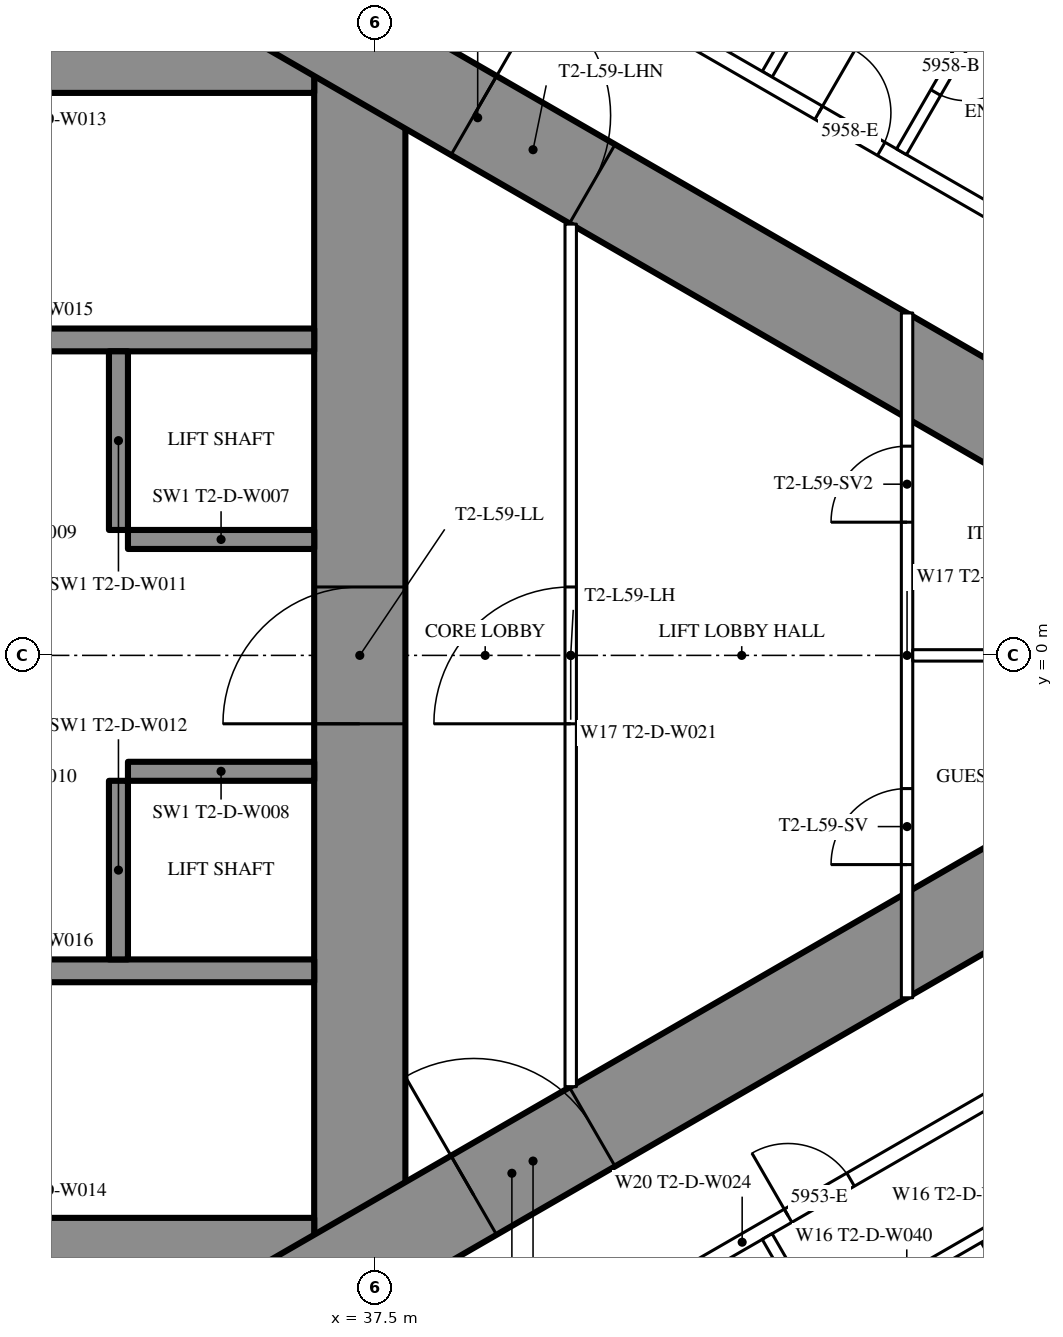
"""IFC4 building model, lengths in metres.
Left out: names, types, materials, properties, quantities, classifications, styles, units other than length and angle.
Written with IfcOpenShell. Run it as: python <this file> out.ifc"""

import sys

from ifc_helpers import new_model, si_unit, direction, frame, frame_2d, origin, place, context, subcontext, project, spatial, rectangle, extrude, element, fill, save


model = new_model("IFC4")
c1 = context("Model", 3, precision=1e-05, world=origin(), true_north=direction((0.0, 1.0)))
c2 = subcontext(c1, "Body", "Model", "MODEL_VIEW")
j1 = project(units=[si_unit("LENGTHUNIT", "METRE"), si_unit("PLANEANGLEUNIT", "RADIAN")], contexts=[c1])
p1 = place(None, origin())
s1 = spatial("IfcSite", under=j1, at=p1, CompositionType="ELEMENT")
p2 = place(p1, origin())
s2 = spatial("IfcBuilding", under=s1, at=p2, CompositionType="ELEMENT")
p3 = place(p2, frame((0.0, 0.0, 222.5)))
s3 = spatial("IfcBuildingStorey", under=s2, at=p3, CompositionType="ELEMENT", Elevation=222.5)
p4 = place(p3, frame((37.3, -8.6, 0.0), z_axis=(0.0, 0.0, 1.0), x_axis=(0.0, 1.0, 0.0)))
e1 = element("IfcWall", 1, at=p4, inside=s3, PredefinedType="SHEAR", context=c2, shape_type="SweptSolid", body=[
    extrude(rectangle(XDim=17.2, YDim=1.2, at=frame_2d((8.6, 0.0))), origin(), (0.0, 0.0, 1.0), 3.6),
])
p5 = place(p4, frame((7.7, 0.0, 0.0)))
e2 = element("IfcOpeningElement", 2, at=p5, cuts=e1, PredefinedType="OPENING", context=c2, shape_type="SweptSolid", body=[
    extrude(rectangle(XDim=1.8, YDim=2.2, at=frame_2d((0.9, 1.1))), frame((0.0, 0.61, 0.0), z_axis=(0.0, -1.0, 0.0), x_axis=(1.0, 0.0, 0.0)), (0.0, 0.0, 1.0), 1.22),
])
p6 = place(p3, frame((28.3, -8.0, 0.0), z_axis=(0.0, 0.0, 1.0), x_axis=(1.0, 0.0, 0.0)))
e3 = element("IfcWall", 3, at=p6, inside=s3, PredefinedType="SHEAR", context=c2, shape_type="SweptSolid", body=[
    extrude(rectangle(XDim=8.4, YDim=1.2, at=frame_2d((4.2, 0.0))), origin(), (0.0, 0.0, 1.0), 3.6),
])
p7 = place(p6, frame((0.25, 0.0, 0.0)))
e4 = element("IfcOpeningElement", 4, at=p7, cuts=e3, PredefinedType="OPENING", context=c2, shape_type="SweptSolid", body=[
    extrude(rectangle(XDim=1.0, YDim=2.2, at=frame_2d((0.5, 1.1))), frame((0.0, 0.61, 0.0), z_axis=(0.0, -1.0, 0.0), x_axis=(1.0, 0.0, 0.0)), (0.0, 0.0, 1.0), 1.22),
])
p8 = place(p3, frame((28.3, 8.0, 0.0), z_axis=(0.0, 0.0, 1.0), x_axis=(1.0, 0.0, 0.0)))
e5 = element("IfcWall", 5, at=p8, inside=s3, PredefinedType="SHEAR", context=c2, shape_type="SweptSolid", body=[
    extrude(rectangle(XDim=8.4, YDim=1.2, at=frame_2d((4.2, 0.0))), origin(), (0.0, 0.0, 1.0), 3.6),
])
p9 = place(p8, frame((0.25, 0.0, 0.0)))
e6 = element("IfcOpeningElement", 6, at=p9, cuts=e5, PredefinedType="OPENING", context=c2, shape_type="SweptSolid", body=[
    extrude(rectangle(XDim=1.0, YDim=2.2, at=frame_2d((0.5, 1.1))), frame((0.0, 0.61, 0.0), z_axis=(0.0, -1.0, 0.0), x_axis=(1.0, 0.0, 0.0)), (0.0, 0.0, 1.0), 1.22),
])
for number, where, z_axis, x_axis in (
    (7, (28.3, -4.15, 0.0), (0.0, 0.0, 1.0), (1.0, 0.0, 0.0)),
    (8, (28.3, 4.15, 0.0), (0.0, 0.0, 1.0), (1.0, 0.0, 0.0)),
):
    element("IfcWall", number, at=place(p3, frame(where, z_axis=z_axis, x_axis=x_axis)), inside=s3, PredefinedType="SHEAR", context=c2, shape_type="SweptSolid", body=[
        extrude(rectangle(XDim=8.4, YDim=0.3, at=frame_2d((4.2, 0.0))), origin(), (0.0, 0.0, 1.0), 3.6),
    ])
p10 = place(p3, frame((34.125, -4.0, 0.0), z_axis=(0.0, 0.0, 1.0), x_axis=(0.0, 1.0, 0.0)))
e9 = element("IfcWall", 9, at=p10, inside=s3, PredefinedType="SHEAR", context=c2, shape_type="SweptSolid", body=[
    extrude(rectangle(XDim=2.35, YDim=0.25, at=frame_2d((1.175, 0.0))), origin(), (0.0, 0.0, 1.0), 3.6),
])
p11 = place(p3, frame((34.25, -1.525, 0.0), z_axis=(0.0, 0.0, 1.0), x_axis=(1.0, 0.0, 0.0)))
e10 = element("IfcWall", 10, at=p11, inside=s3, PredefinedType="SHEAR", context=c2, shape_type="SweptSolid", body=[
    extrude(rectangle(XDim=2.45, YDim=0.25, at=frame_2d((1.225, 0.0))), origin(), (0.0, 0.0, 1.0), 3.6),
])
p12 = place(p3, frame((34.125, 1.65, 0.0), z_axis=(0.0, 0.0, 1.0), x_axis=(0.0, 1.0, 0.0)))
e11 = element("IfcWall", 11, at=p12, inside=s3, PredefinedType="SHEAR", context=c2, shape_type="SweptSolid", body=[
    extrude(rectangle(XDim=2.35, YDim=0.25, at=frame_2d((1.175, 0.0))), origin(), (0.0, 0.0, 1.0), 3.6),
])
p13 = place(p3, frame((34.25, 1.525, 0.0), z_axis=(0.0, 0.0, 1.0), x_axis=(1.0, 0.0, 0.0)))
e12 = element("IfcWall", 12, at=p13, inside=s3, PredefinedType="SHEAR", context=c2, shape_type="SweptSolid", body=[
    extrude(rectangle(XDim=2.45, YDim=0.25, at=frame_2d((1.225, 0.0))), origin(), (0.0, 0.0, 1.0), 3.6),
])
p14 = place(p3, frame((27.2, -13.8, 0.0), z_axis=(0.0, 0.0, 1.0), x_axis=(0.866027159892, 0.499996958321, 0.0)))
e13 = element("IfcWall", 13, at=p14, inside=s3, PredefinedType="SHEAR", context=c2, shape_type="SweptSolid", body=[
    extrude(rectangle(XDim=27.947, YDim=1.2, at=frame_2d((13.973, 0.0))), origin(), (0.0, 0.0, 1.0), 3.6),
])
p15 = place(p14, frame((4.6, 0.0, 0.0)))
e14 = element("IfcOpeningElement", 14, at=p15, cuts=e13, PredefinedType="OPENING", context=c2, shape_type="SweptSolid", body=[
    extrude(rectangle(XDim=1.0, YDim=2.2, at=frame_2d((0.5, 1.1))), frame((0.0, 0.61, 0.0), z_axis=(0.0, -1.0, 0.0), x_axis=(1.0, 0.0, 0.0)), (0.0, 0.0, 1.0), 1.22),
])
p16 = place(p14, frame((13.395, 0.0, 0.0)))
e15 = element("IfcOpeningElement", 15, at=p16, cuts=e13, PredefinedType="OPENING", context=c2, shape_type="SweptSolid", body=[
    extrude(rectangle(XDim=1.8, YDim=2.2, at=frame_2d((0.9, 1.1))), frame((0.0, 0.61, 0.0), z_axis=(0.0, -1.0, 0.0), x_axis=(1.0, 0.0, 0.0)), (0.0, 0.0, 1.0), 1.22),
])
p17 = place(p3, frame((27.2, 13.8, 0.0), z_axis=(0.0, 0.0, 1.0), x_axis=(0.866024515034, -0.500001539357, 0.0)))
e16 = element("IfcWall", 16, at=p17, inside=s3, PredefinedType="SHEAR", context=c2, shape_type="SweptSolid", body=[
    extrude(rectangle(XDim=26.907, YDim=1.2, at=frame_2d((13.454, 0.0))), origin(), (0.0, 0.0, 1.0), 3.6),
])
p18 = place(p17, frame((4.6, 0.0, 0.0)))
e17 = element("IfcOpeningElement", 17, at=p18, cuts=e16, PredefinedType="OPENING", context=c2, shape_type="SweptSolid", body=[
    extrude(rectangle(XDim=1.0, YDim=2.2, at=frame_2d((0.5, 1.1))), frame((0.0, 0.61, 0.0), z_axis=(0.0, -1.0, 0.0), x_axis=(1.0, 0.0, 0.0)), (0.0, 0.0, 1.0), 1.22),
])
p19 = place(p17, frame((13.395, 0.0, 0.0)))
e18 = element("IfcOpeningElement", 18, at=p19, cuts=e16, PredefinedType="OPENING", context=c2, shape_type="SweptSolid", body=[
    extrude(rectangle(XDim=1.8, YDim=2.2, at=frame_2d((0.9, 1.1))), frame((0.0, 0.61, 0.0), z_axis=(0.0, -1.0, 0.0), x_axis=(1.0, 0.0, 0.0)), (0.0, 0.0, 1.0), 1.22),
])
p20 = place(p3, frame((28.959, -15.44, 0.0), z_axis=(0.0, 0.0, 1.0), x_axis=(0.866025227435, 0.500000305447, 0.0)))
e19 = element("IfcWall", 19, at=p20, inside=s3, PredefinedType="PARTITIONING", context=c2, shape_type="SweptSolid", body=[
    extrude(rectangle(XDim=30.88, YDim=0.2, at=frame_2d((15.44, 0.0))), origin(), (0.0, 0.0, 1.0), 3.35),
])
p21 = place(p20, frame((1.494, 0.0, 0.0)))
e20 = element("IfcOpeningElement", 20, at=p21, cuts=e19, PredefinedType="OPENING", context=c2, shape_type="SweptSolid", body=[
    extrude(rectangle(XDim=1.8, YDim=2.03, at=frame_2d((0.9, 1.015))), frame((0.0, 0.11, 0.0), z_axis=(0.0, -1.0, 0.0), x_axis=(1.0, 0.0, 0.0)), (0.0, 0.0, 1.0), 0.22),
])
p22 = place(p20, frame((7.687, 0.0, 0.0)))
e21 = element("IfcOpeningElement", 21, at=p22, cuts=e19, PredefinedType="OPENING", context=c2, shape_type="SweptSolid", body=[
    extrude(rectangle(XDim=1.0, YDim=2.2, at=frame_2d((0.5, 1.1))), frame((0.0, 0.11, 0.0), z_axis=(0.0, -1.0, 0.0), x_axis=(1.0, 0.0, 0.0)), (0.0, 0.0, 1.0), 0.22),
])
p23 = place(p20, frame((16.137, 0.0, 0.0)))
e22 = element("IfcOpeningElement", 22, at=p23, cuts=e19, PredefinedType="OPENING", context=c2, shape_type="SweptSolid", body=[
    extrude(rectangle(XDim=0.95, YDim=2.2, at=frame_2d((0.475, 1.1))), frame((0.0, 0.11, 0.0), z_axis=(0.0, -1.0, 0.0), x_axis=(1.0, 0.0, 0.0)), (0.0, 0.0, 1.0), 0.22),
])
p24 = place(p20, frame((20.021, 0.0, 0.0)))
e23 = element("IfcOpeningElement", 23, at=p24, cuts=e19, PredefinedType="OPENING", context=c2, shape_type="SweptSolid", body=[
    extrude(rectangle(XDim=0.95, YDim=2.2, at=frame_2d((0.475, 1.1))), frame((0.0, 0.11, 0.0), z_axis=(0.0, -1.0, 0.0), x_axis=(1.0, 0.0, 0.0)), (0.0, 0.0, 1.0), 0.22),
])
p25 = place(p20, frame((26.253, 0.0, 0.0)))
e24 = element("IfcOpeningElement", 24, at=p25, cuts=e19, PredefinedType="OPENING", context=c2, shape_type="SweptSolid", body=[
    extrude(rectangle(XDim=0.95, YDim=2.2, at=frame_2d((0.475, 1.1))), frame((0.0, 0.11, 0.0), z_axis=(0.0, -1.0, 0.0), x_axis=(1.0, 0.0, 0.0)), (0.0, 0.0, 1.0), 0.22),
])
for number, where, z_axis, x_axis in (
    (25, (42.66, -7.646, 0.0), (0.0, 0.0, 1.0), (0.5, -0.866, 0.0)),
    (26, (42.66, 7.646, 0.0), (0.0, 0.0, 1.0), (0.5, 0.866, 0.0)),
):
    element("IfcWall", number, at=place(p3, frame(where, z_axis=z_axis, x_axis=x_axis)), inside=s3, PredefinedType="PARTITIONING", context=c2, shape_type="SweptSolid", body=[
        extrude(rectangle(XDim=6.398, YDim=0.15, at=frame_2d((3.199, 0.0))), origin(), (0.0, 0.0, 1.0), 2.45),
    ])
p26 = place(p3, frame((28.959, 15.44, 0.0), z_axis=(0.0, 0.0, 1.0), x_axis=(0.866028936079, -0.499993881836, 0.0)))
e27 = element("IfcWall", 27, at=p26, inside=s3, PredefinedType="PARTITIONING", context=c2, shape_type="SweptSolid", body=[
    extrude(rectangle(XDim=20.503, YDim=0.2, at=frame_2d((10.251, 0.0))), origin(), (0.0, 0.0, 1.0), 3.35),
])
p27 = place(p26, frame((16.603, 0.0, 0.0)))
e28 = element("IfcOpeningElement", 28, at=p27, cuts=e27, PredefinedType="OPENING", context=c2, shape_type="SweptSolid", body=[
    extrude(rectangle(XDim=0.95, YDim=2.2, at=frame_2d((0.475, 1.1))), frame((0.0, 0.11, 0.0), z_axis=(0.0, -1.0, 0.0), x_axis=(1.0, 0.0, 0.0)), (0.0, 0.0, 1.0), 0.22),
])
p28 = place(p26, frame((7.287, 0.0, 0.0)))
e29 = element("IfcOpeningElement", 29, at=p28, cuts=e27, PredefinedType="OPENING", context=c2, shape_type="SweptSolid", body=[
    extrude(rectangle(XDim=0.95, YDim=2.2, at=frame_2d((0.475, 1.1))), frame((0.0, 0.11, 0.0), z_axis=(0.0, -1.0, 0.0), x_axis=(1.0, 0.0, 0.0)), (0.0, 0.0, 1.0), 0.22),
])
p29 = place(p26, frame((2.244, 0.0, 0.0)))
e30 = element("IfcOpeningElement", 30, at=p29, cuts=e27, PredefinedType="OPENING", context=c2, shape_type="SweptSolid", body=[
    extrude(rectangle(XDim=1.8, YDim=2.03, at=frame_2d((0.9, 1.015))), frame((0.0, 0.11, 0.0), z_axis=(0.0, -1.0, 0.0), x_axis=(1.0, 0.0, 0.0)), (0.0, 0.0, 1.0), 0.22),
])
p30 = place(p3, frame((45.503, -7.621, 0.0), z_axis=(0.0, 0.0, 1.0), x_axis=(0.500006934395, -0.866021400173, 0.0)))
e31 = element("IfcWall", 31, at=p30, inside=s3, PredefinedType="PARTITIONING", context=c2, shape_type="SweptSolid", body=[
    extrude(rectangle(XDim=2.6, YDim=0.15, at=frame_2d((1.3, 0.0))), origin(), (0.0, 0.0, 1.0), 3.35),
])
p31 = place(p30, frame((0.9, 0.0, 0.0)))
e32 = element("IfcOpeningElement", 32, at=p31, cuts=e31, PredefinedType="OPENING", context=c2, shape_type="SweptSolid", body=[
    extrude(rectangle(XDim=0.8, YDim=2.2, at=frame_2d((0.4, 1.1))), frame((0.0, 0.085, 0.0), z_axis=(0.0, -1.0, 0.0), x_axis=(1.0, 0.0, 0.0)), (0.0, 0.0, 1.0), 0.17),
])
p32 = place(p3, frame((43.425, -8.821, 0.0), z_axis=(0.0, 0.0, 1.0), x_axis=(0.866006523861, 0.500032699561, 0.0)))
e33 = element("IfcWall", 33, at=p32, inside=s3, PredefinedType="PARTITIONING", context=c2, shape_type="SweptSolid", body=[
    extrude(rectangle(XDim=2.475, YDim=0.15, at=frame_2d((1.237, 0.0))), origin(), (0.0, 0.0, 1.0), 3.35),
])
p33 = place(p3, frame((44.427, 6.625, 0.0), z_axis=(0.0, 0.0, 1.0), x_axis=(0.500006934395, 0.866021400173, 0.0)))
e34 = element("IfcWall", 34, at=p33, inside=s3, PredefinedType="PARTITIONING", context=c2, shape_type="SweptSolid", body=[
    extrude(rectangle(XDim=2.6, YDim=0.15, at=frame_2d((1.3, 0.0))), origin(), (0.0, 0.0, 1.0), 3.35),
])
p34 = place(p33, frame((0.9, 0.0, 0.0)))
e35 = element("IfcOpeningElement", 35, at=p34, cuts=e34, PredefinedType="OPENING", context=c2, shape_type="SweptSolid", body=[
    extrude(rectangle(XDim=0.8, YDim=2.2, at=frame_2d((0.4, 1.1))), frame((0.0, 0.085, 0.0), z_axis=(0.0, -1.0, 0.0), x_axis=(1.0, 0.0, 0.0)), (0.0, 0.0, 1.0), 0.17),
])
p35 = place(p3, frame((40.075, -5.674, 0.0), z_axis=(0.0, 0.0, 1.0), x_axis=(0.0, 1.0, 0.0)))
e36 = element("IfcWall", 36, at=p35, inside=s3, PredefinedType="PARTITIONING", context=c2, shape_type="SweptSolid", body=[
    extrude(rectangle(XDim=11.348, YDim=0.15, at=frame_2d((5.674, 0.0))), origin(), (0.0, 0.0, 1.0), 3.35),
])
p36 = place(p35, frame((4.774, 0.0, 0.0)))
e37 = element("IfcOpeningElement", 37, at=p36, cuts=e36, PredefinedType="OPENING", context=c2, shape_type="SweptSolid", body=[
    extrude(rectangle(XDim=1.8, YDim=2.2, at=frame_2d((0.9, 1.1))), frame((0.0, 0.085, 0.0), z_axis=(0.0, -1.0, 0.0), x_axis=(1.0, 0.0, 0.0)), (0.0, 0.0, 1.0), 0.17),
])
p37 = place(p3, frame((44.5, -4.505, 0.0), z_axis=(0.0, 0.0, 1.0), x_axis=(0.0, 1.0, 0.0)))
e38 = element("IfcWall", 38, at=p37, inside=s3, PredefinedType="PARTITIONING", context=c2, shape_type="SweptSolid", body=[
    extrude(rectangle(XDim=9.009, YDim=0.15, at=frame_2d((4.505, 0.0))), origin(), (0.0, 0.0, 1.0), 3.35),
])
p38 = place(p37, frame((1.752, 0.0, 0.0)))
e39 = element("IfcOpeningElement", 39, at=p38, cuts=e38, PredefinedType="OPENING", context=c2, shape_type="SweptSolid", body=[
    extrude(rectangle(XDim=1.0, YDim=2.2, at=frame_2d((0.5, 1.1))), frame((0.0, 0.085, 0.0), z_axis=(0.0, -1.0, 0.0), x_axis=(1.0, 0.0, 0.0)), (0.0, 0.0, 1.0), 0.17),
])
p39 = place(p37, frame((6.257, 0.0, 0.0)))
e40 = element("IfcOpeningElement", 40, at=p39, cuts=e38, PredefinedType="OPENING", context=c2, shape_type="SweptSolid", body=[
    extrude(rectangle(XDim=1.0, YDim=2.2, at=frame_2d((0.5, 1.1))), frame((0.0, 0.085, 0.0), z_axis=(0.0, -1.0, 0.0), x_axis=(1.0, 0.0, 0.0)), (0.0, 0.0, 1.0), 0.17),
])
p40 = place(p3, frame((44.575, 0.0, 0.0), z_axis=(0.0, 0.0, 1.0), x_axis=(1.0, 0.0, 0.0)))
e41 = element("IfcWall", 41, at=p40, inside=s3, PredefinedType="PARTITIONING", context=c2, shape_type="SweptSolid", body=[
    extrude(rectangle(XDim=7.727, YDim=0.15, at=frame_2d((3.864, 0.0))), origin(), (0.0, 0.0, 1.0), 2.45),
])
p41 = place(p23, origin())
e42 = element("IfcDoor", 42, at=p41, inside=s3, OperationType="SINGLE_SWING_LEFT", PredefinedType="DOOR", context=c2, shape_type="SweptSolid", body=[
    extrude(rectangle(XDim=0.95, YDim=2.2, at=frame_2d((0.475, 1.1))), frame((0.0, 0.025, 0.0), z_axis=(0.0, -1.0, 0.0), x_axis=(1.0, 0.0, 0.0)), (0.0, 0.0, 1.0), 0.05),
])
fill(e22, e42)
p42 = place(p34, origin())
e43 = element("IfcDoor", 43, at=p42, inside=s3, OperationType="SINGLE_SWING_RIGHT", PredefinedType="DOOR", context=c2, shape_type="SweptSolid", body=[
    extrude(rectangle(XDim=0.8, YDim=2.2, at=frame_2d((0.4, 1.1))), frame((0.0, 0.025, 0.0), z_axis=(0.0, -1.0, 0.0), x_axis=(1.0, 0.0, 0.0)), (0.0, 0.0, 1.0), 0.05),
])
fill(e35, e43)
p43 = place(p27, origin())
e44 = element("IfcDoor", 44, at=p43, inside=s3, OperationType="SINGLE_SWING_LEFT", PredefinedType="DOOR", context=c2, shape_type="SweptSolid", body=[
    extrude(rectangle(XDim=0.95, YDim=2.2, at=frame_2d((0.475, 1.1))), frame((0.0, 0.025, 0.0), z_axis=(0.0, -1.0, 0.0), x_axis=(1.0, 0.0, 0.0)), (0.0, 0.0, 1.0), 0.05),
])
fill(e28, e44)
p44 = place(p36, origin())
e45 = element("IfcDoor", 45, at=p44, inside=s3, OperationType="DOUBLE_DOOR_SINGLE_SWING", PredefinedType="DOOR", context=c2, shape_type="SweptSolid", body=[
    extrude(rectangle(XDim=1.8, YDim=2.2, at=frame_2d((0.9, 1.1))), frame((0.0, 0.025, 0.0), z_axis=(0.0, -1.0, 0.0), x_axis=(1.0, 0.0, 0.0)), (0.0, 0.0, 1.0), 0.05),
])
fill(e37, e45)
p45 = place(p38, origin())
e46 = element("IfcDoor", 46, at=p45, inside=s3, OperationType="SINGLE_SWING_LEFT", PredefinedType="DOOR", context=c2, shape_type="SweptSolid", body=[
    extrude(rectangle(XDim=1.0, YDim=2.2, at=frame_2d((0.5, 1.1))), frame((0.0, 0.025, 0.0), z_axis=(0.0, -1.0, 0.0), x_axis=(1.0, 0.0, 0.0)), (0.0, 0.0, 1.0), 0.05),
])
fill(e39, e46)
p46 = place(p39, origin())
e47 = element("IfcDoor", 47, at=p46, inside=s3, OperationType="SINGLE_SWING_LEFT", PredefinedType="DOOR", context=c2, shape_type="SweptSolid", body=[
    extrude(rectangle(XDim=1.0, YDim=2.2, at=frame_2d((0.5, 1.1))), frame((0.0, 0.025, 0.0), z_axis=(0.0, -1.0, 0.0), x_axis=(1.0, 0.0, 0.0)), (0.0, 0.0, 1.0), 0.05),
])
fill(e40, e47)
p47 = place(p16, origin())
e48 = element("IfcDoor", 48, at=p47, inside=s3, OperationType="DOUBLE_DOOR_SINGLE_SWING", PredefinedType="DOOR", context=c2, shape_type="SweptSolid", body=[
    extrude(rectangle(XDim=1.8, YDim=2.2, at=frame_2d((0.9, 1.1))), frame((0.0, 0.025, 0.0), z_axis=(0.0, -1.0, 0.0), x_axis=(1.0, 0.0, 0.0)), (0.0, 0.0, 1.0), 0.05),
])
fill(e15, e48)
p48 = place(p19, origin())
e49 = element("IfcDoor", 49, at=p48, inside=s3, OperationType="DOUBLE_DOOR_SINGLE_SWING", PredefinedType="DOOR", context=c2, shape_type="SweptSolid", body=[
    extrude(rectangle(XDim=1.8, YDim=2.2, at=frame_2d((0.9, 1.1))), frame((0.0, 0.025, 0.0), z_axis=(0.0, -1.0, 0.0), x_axis=(1.0, 0.0, 0.0)), (0.0, 0.0, 1.0), 0.05),
])
fill(e18, e49)
p49 = place(p5, origin())
e50 = element("IfcDoor", 50, at=p49, inside=s3, OperationType="DOUBLE_DOOR_SINGLE_SWING", PredefinedType="DOOR", context=c2, shape_type="SweptSolid", body=[
    extrude(rectangle(XDim=1.8, YDim=2.2, at=frame_2d((0.9, 1.1))), frame((0.0, 0.025, 0.0), z_axis=(0.0, -1.0, 0.0), x_axis=(1.0, 0.0, 0.0)), (0.0, 0.0, 1.0), 0.05),
])
fill(e2, e50)
save(model, sys.argv[1])
